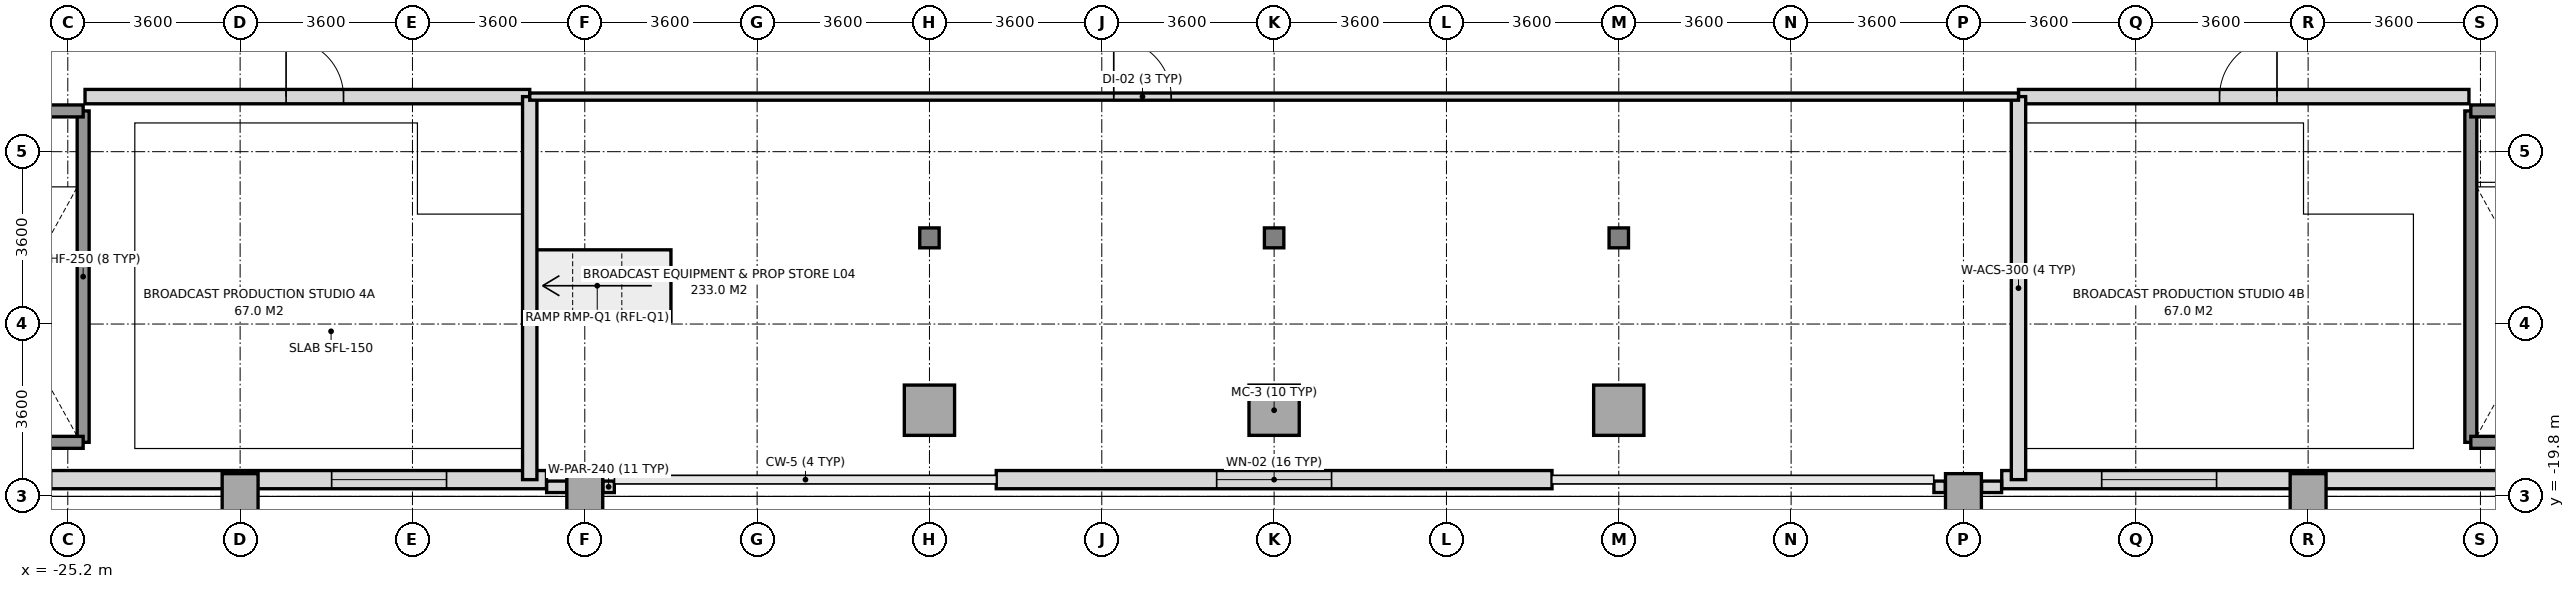
"""IFC4 building model, lengths in metres.
Left out: names, types, materials, properties, quantities, classifications, styles, units other than length and angle.
Written with IfcOpenShell. Run it as: python <this file> out.ifc"""

import sys

from ifc_helpers import new_model, si_unit, direction, frame, frame_2d, origin, origin_2d, place, context, subcontext, project, spatial, rectangle, i_section, extrude, source, transform, mapped, element, fill, save


model = new_model("IFC4")
c1 = context("Model", 3, precision=1e-05, world=origin(), true_north=direction((0.0, 1.0)))
c2 = subcontext(c1, "Body", "Model", "MODEL_VIEW")
j1 = project(units=[si_unit("LENGTHUNIT", "METRE"), si_unit("PLANEANGLEUNIT", "RADIAN")], contexts=[c1])
p1 = place(None, origin())
s1 = spatial("IfcSite", under=j1, at=p1, CompositionType="ELEMENT")
p2 = place(p1, origin())
s2 = spatial("IfcBuilding", under=s1, at=p2, CompositionType="ELEMENT")
p3 = place(p2, frame((0.0, 0.0, 20.4)))
s3 = spatial("IfcBuildingStorey", under=s2, at=p3, CompositionType="ELEMENT", Elevation=20.4)
m1 = source(origin(), c2, "Body", "SweptSolid", [
    extrude(rectangle(XDim=0.75, YDim=0.95, at=origin_2d()), origin(), (0.0, 0.0, 1.0), 4.48),
])
for number, where, z_axis, x_axis in (
    (1, (-21.6, -19.8, 0.0), (0.0, 0.0, 1.0), (1.0, 0.0, 0.0)),
    (2, (-14.4, -19.8, 0.0), (0.0, 0.0, 1.0), (1.0, 0.0, 0.0)),
):
    element("IfcColumn", number, at=place(p3, frame(where, z_axis=z_axis, x_axis=x_axis)), inside=s3, PredefinedType="COLUMN", context=c2, shape_type="MappedRepresentation", body=[
        mapped(m1, transform((0.0, 0.0, 0.0), x_axis=(1.0, 0.0, 0.0), y_axis=(0.0, 1.0, 0.0), z_axis=(0.0, 0.0, 1.0), scale=1.0)),
    ])
m2 = source(origin(), c2, "Body", "SweptSolid", [
    extrude(rectangle(XDim=1.05, YDim=1.05, at=origin_2d()), origin(), (0.0, 0.0, 1.0), 4.48),
])
p4 = place(p3, frame((-7.2, -18.0, 0.0), z_axis=(0.0, 0.0, 1.0), x_axis=(1.0, 0.0, 0.0)))
e3 = element("IfcColumn", 3, at=p4, inside=s3, PredefinedType="COLUMN", context=c2, shape_type="MappedRepresentation", body=[
    mapped(m2, transform((0.0, 0.0, 0.0), x_axis=(1.0, 0.0, 0.0), y_axis=(0.0, 1.0, 0.0), z_axis=(0.0, 0.0, 1.0), scale=1.0)),
])
m3 = source(origin(), c2, "Body", "SweptSolid", [
    extrude(i_section(OverallWidth=0.406, OverallDepth=0.416, WebThickness=0.024, FlangeThickness=0.039, at=origin_2d()), origin(), (0.0, 0.0, 1.0), 4.48),
])
p5 = place(p3, frame((-7.2, -14.4, 0.0), z_axis=(0.0, 0.0, 1.0), x_axis=(1.0, 0.0, 0.0)))
e4 = element("IfcColumn", 4, at=p5, inside=s3, PredefinedType="COLUMN", context=c2, shape_type="MappedRepresentation", body=[
    mapped(m3, transform((0.0, 0.0, 0.0), x_axis=(1.0, 0.0, 0.0), y_axis=(0.0, 1.0, 0.0), z_axis=(0.0, 0.0, 1.0), scale=1.0)),
])
p6 = place(p3, frame((0.0, -18.0, 0.0), z_axis=(0.0, 0.0, 1.0), x_axis=(1.0, 0.0, 0.0)))
e5 = element("IfcColumn", 5, at=p6, inside=s3, PredefinedType="COLUMN", context=c2, shape_type="MappedRepresentation", body=[
    mapped(m2, transform((0.0, 0.0, 0.0), x_axis=(1.0, 0.0, 0.0), y_axis=(0.0, 1.0, 0.0), z_axis=(0.0, 0.0, 1.0), scale=1.0)),
])
p7 = place(p3, frame((0.0, -14.4, 0.0), z_axis=(0.0, 0.0, 1.0), x_axis=(1.0, 0.0, 0.0)))
e6 = element("IfcColumn", 6, at=p7, inside=s3, PredefinedType="COLUMN", context=c2, shape_type="MappedRepresentation", body=[
    mapped(m3, transform((0.0, 0.0, 0.0), x_axis=(1.0, 0.0, 0.0), y_axis=(0.0, 1.0, 0.0), z_axis=(0.0, 0.0, 1.0), scale=1.0)),
])
p8 = place(p3, frame((7.2, -18.0, 0.0), z_axis=(0.0, 0.0, 1.0), x_axis=(1.0, 0.0, 0.0)))
e7 = element("IfcColumn", 7, at=p8, inside=s3, PredefinedType="COLUMN", context=c2, shape_type="MappedRepresentation", body=[
    mapped(m2, transform((0.0, 0.0, 0.0), x_axis=(1.0, 0.0, 0.0), y_axis=(0.0, 1.0, 0.0), z_axis=(0.0, 0.0, 1.0), scale=1.0)),
])
p9 = place(p3, frame((7.2, -14.4, 0.0), z_axis=(0.0, 0.0, 1.0), x_axis=(1.0, 0.0, 0.0)))
e8 = element("IfcColumn", 8, at=p9, inside=s3, PredefinedType="COLUMN", context=c2, shape_type="MappedRepresentation", body=[
    mapped(m3, transform((0.0, 0.0, 0.0), x_axis=(1.0, 0.0, 0.0), y_axis=(0.0, 1.0, 0.0), z_axis=(0.0, 0.0, 1.0), scale=1.0)),
])
for number, where, z_axis, x_axis in (
    (9, (14.4, -19.8, 0.0), (0.0, 0.0, 1.0), (1.0, 0.0, 0.0)),
    (10, (21.6, -19.8, 0.0), (0.0, 0.0, 1.0), (1.0, 0.0, 0.0)),
):
    element("IfcColumn", number, at=place(p3, frame(where, z_axis=z_axis, x_axis=x_axis)), inside=s3, PredefinedType="COLUMN", context=c2, shape_type="MappedRepresentation", body=[
        mapped(m1, transform((0.0, 0.0, 0.0), x_axis=(1.0, 0.0, 0.0), y_axis=(0.0, 1.0, 0.0), z_axis=(0.0, 0.0, 1.0), scale=1.0)),
    ])
p10 = place(p3, frame((-32.05, -19.45, 0.0), z_axis=(0.0, 0.0, 1.0), x_axis=(1.0, 0.0, 0.0)))
e11 = element("IfcWall", 11, at=p10, inside=s3, PredefinedType="SOLIDWALL", context=c2, shape_type="SweptSolid", body=[
    extrude(rectangle(XDim=16.85, YDim=0.38, at=frame_2d((8.425, 0.0))), origin(), (0.0, 0.0, 1.0), 4.48),
])
p11 = place(p10, frame((4.112, 0.0, 0.95)))
e12 = element("IfcOpeningElement", 12, at=p11, cuts=e11, PredefinedType="OPENING", context=c2, shape_type="SweptSolid", body=[
    extrude(rectangle(XDim=2.4, YDim=2.2, at=frame_2d((1.2, 1.1))), frame((0.0, 0.2, 0.0), z_axis=(0.0, -1.0, 0.0), x_axis=(1.0, 0.0, 0.0)), (0.0, 0.0, 1.0), 0.4),
])
p12 = place(p10, frame((12.362, 0.0, 0.95)))
e13 = element("IfcOpeningElement", 13, at=p12, cuts=e11, PredefinedType="OPENING", context=c2, shape_type="SweptSolid", body=[
    extrude(rectangle(XDim=2.4, YDim=2.2, at=frame_2d((1.2, 1.1))), frame((0.0, 0.2, 0.0), z_axis=(0.0, -1.0, 0.0), x_axis=(1.0, 0.0, 0.0)), (0.0, 0.0, 1.0), 0.4),
])
p13 = place(p3, frame((15.2, -19.45, 0.0), z_axis=(0.0, 0.0, 1.0), x_axis=(1.0, 0.0, 0.0)))
e14 = element("IfcWall", 14, at=p13, inside=s3, PredefinedType="SOLIDWALL", context=c2, shape_type="SweptSolid", body=[
    extrude(rectangle(XDim=16.85, YDim=0.38, at=frame_2d((8.425, 0.0))), origin(), (0.0, 0.0, 1.0), 4.48),
])
p14 = place(p13, frame((2.088, 0.0, 0.95)))
e15 = element("IfcOpeningElement", 15, at=p14, cuts=e14, PredefinedType="OPENING", context=c2, shape_type="SweptSolid", body=[
    extrude(rectangle(XDim=2.4, YDim=2.2, at=frame_2d((1.2, 1.1))), frame((0.0, 0.2, 0.0), z_axis=(0.0, -1.0, 0.0), x_axis=(1.0, 0.0, 0.0)), (0.0, 0.0, 1.0), 0.4),
])
p15 = place(p13, frame((10.338, 0.0, 0.95)))
e16 = element("IfcOpeningElement", 16, at=p15, cuts=e14, PredefinedType="OPENING", context=c2, shape_type="SweptSolid", body=[
    extrude(rectangle(XDim=2.4, YDim=2.2, at=frame_2d((1.2, 1.1))), frame((0.0, 0.2, 0.0), z_axis=(0.0, -1.0, 0.0), x_axis=(1.0, 0.0, 0.0)), (0.0, 0.0, 1.0), 0.4),
])
p16 = place(p3, frame((-5.805, -19.45, 0.0), z_axis=(0.0, 0.0, 1.0), x_axis=(1.0, 0.0, 0.0)))
e17 = element("IfcWall", 17, at=p16, inside=s3, PredefinedType="SOLIDWALL", context=c2, shape_type="SweptSolid", body=[
    extrude(rectangle(XDim=11.61, YDim=0.38, at=frame_2d((5.805, 0.0))), origin(), (0.0, 0.0, 1.0), 4.48),
])
p17 = place(p16, frame((4.605, 0.0, 0.95)))
e18 = element("IfcOpeningElement", 18, at=p17, cuts=e17, PredefinedType="OPENING", context=c2, shape_type="SweptSolid", body=[
    extrude(rectangle(XDim=2.4, YDim=2.2, at=frame_2d((1.2, 1.1))), frame((0.0, 0.2, 0.0), z_axis=(0.0, -1.0, 0.0), x_axis=(1.0, 0.0, 0.0)), (0.0, 0.0, 1.0), 0.4),
])
p18 = place(p3, frame((15.197, -19.6, 0.0), z_axis=(0.0, 0.0, 1.0), x_axis=(-1.0, 0.0, 0.0)))
e19 = element("IfcWall", 19, at=p18, inside=s3, PredefinedType="PARAPET", context=c2, shape_type="SweptSolid", body=[
    extrude(rectangle(XDim=0.419, YDim=0.24, at=frame_2d((0.209, 0.0))), origin(), (0.0, 0.0, 1.0), 1.15),
])
for number, where, z_axis, x_axis in (
    (20, (14.022, -19.6, 0.0), (0.0, 0.0, 1.0), (-1.0, 0.0, 0.0)),
    (21, (-13.783, -19.6, 0.0), (0.0, 0.0, 1.0), (-1.0, 0.0, 0.0)),
):
    element("IfcWall", number, at=place(p3, frame(where, z_axis=z_axis, x_axis=x_axis)), inside=s3, PredefinedType="PARAPET", context=c2, shape_type="SweptSolid", body=[
        extrude(rectangle(XDim=0.239, YDim=0.24, at=frame_2d((0.12, 0.0))), origin(), (0.0, 0.0, 1.0), 1.15),
    ])
p19 = place(p3, frame((-14.778, -19.6, 0.0), z_axis=(0.0, 0.0, 1.0), x_axis=(-1.0, 0.0, 0.0)))
e22 = element("IfcWall", 22, at=p19, inside=s3, PredefinedType="PARAPET", context=c2, shape_type="SweptSolid", body=[
    extrude(rectangle(XDim=0.419, YDim=0.24, at=frame_2d((0.209, 0.0))), origin(), (0.0, 0.0, 1.0), 1.15),
])
p20 = place(p3, frame((-24.879, -18.671, 0.0), z_axis=(0.0, 0.0, 1.0), x_axis=(0.0, 1.0, 0.0)))
e23 = element("IfcWall", 23, at=p20, inside=s3, PredefinedType="SOLIDWALL", context=c2, shape_type="SweptSolid", body=[
    extrude(rectangle(XDim=6.922, YDim=0.25, at=frame_2d((3.461, 0.0))), origin(), (0.0, 0.0, 1.0), 4.48),
])
p21 = place(p3, frame((-28.001, -18.671, 0.0), z_axis=(0.0, 0.0, 1.0), x_axis=(1.0, 0.0, 0.0)))
e24 = element("IfcWall", 24, at=p21, inside=s3, PredefinedType="SOLIDWALL", context=c2, shape_type="SweptSolid", body=[
    extrude(rectangle(XDim=3.122, YDim=0.25, at=frame_2d((1.561, 0.0))), origin(), (0.0, 0.0, 1.0), 4.48),
])
p22 = place(p3, frame((-28.001, -11.749, 0.0), z_axis=(0.0, 0.0, 1.0), x_axis=(1.0, 0.0, 0.0)))
e25 = element("IfcWall", 25, at=p22, inside=s3, PredefinedType="SOLIDWALL", context=c2, shape_type="SweptSolid", body=[
    extrude(rectangle(XDim=3.122, YDim=0.25, at=frame_2d((1.561, 0.0))), origin(), (0.0, 0.0, 1.0), 4.48),
])
p23 = place(p22, frame((0.8, 0.0, 0.0)))
e26 = element("IfcOpeningElement", 26, at=p23, cuts=e25, PredefinedType="OPENING", context=c2, shape_type="SweptSolid", body=[
    extrude(rectangle(XDim=1.2, YDim=2.2, at=frame_2d((0.6, 1.1))), frame((0.0, 0.135, 0.0), z_axis=(0.0, -1.0, 0.0), x_axis=(1.0, 0.0, 0.0)), (0.0, 0.0, 1.0), 0.27),
])
p24 = place(p3, frame((24.999, -18.671, 0.0), z_axis=(0.0, 0.0, 1.0), x_axis=(0.0, 1.0, 0.0)))
e27 = element("IfcWall", 27, at=p24, inside=s3, PredefinedType="SOLIDWALL", context=c2, shape_type="SweptSolid", body=[
    extrude(rectangle(XDim=6.922, YDim=0.25, at=frame_2d((3.461, 0.0))), origin(), (0.0, 0.0, 1.0), 4.48),
])
p25 = place(p3, frame((24.999, -18.671, 0.0), z_axis=(0.0, 0.0, 1.0), x_axis=(1.0, 0.0, 0.0)))
e28 = element("IfcWall", 28, at=p25, inside=s3, PredefinedType="SOLIDWALL", context=c2, shape_type="SweptSolid", body=[
    extrude(rectangle(XDim=3.122, YDim=0.25, at=frame_2d((1.561, 0.0))), origin(), (0.0, 0.0, 1.0), 4.48),
])
p26 = place(p3, frame((24.999, -11.749, 0.0), z_axis=(0.0, 0.0, 1.0), x_axis=(1.0, 0.0, 0.0)))
e29 = element("IfcWall", 29, at=p26, inside=s3, PredefinedType="SOLIDWALL", context=c2, shape_type="SweptSolid", body=[
    extrude(rectangle(XDim=3.122, YDim=0.25, at=frame_2d((1.561, 0.0))), origin(), (0.0, 0.0, 1.0), 4.48),
])
p27 = place(p26, frame((0.8, 0.0, 0.0)))
e30 = element("IfcOpeningElement", 30, at=p27, cuts=e29, PredefinedType="OPENING", context=c2, shape_type="SweptSolid", body=[
    extrude(rectangle(XDim=1.2, YDim=2.2, at=frame_2d((0.6, 1.1))), frame((0.0, 0.135, 0.0), z_axis=(0.0, -1.0, 0.0), x_axis=(1.0, 0.0, 0.0)), (0.0, 0.0, 1.0), 0.27),
])
p28 = place(p3, frame((-24.84, -11.45, 0.0), z_axis=(0.0, 0.0, 1.0), x_axis=(1.0, 0.0, 0.0)))
e31 = element("IfcWall", 31, at=p28, inside=s3, PredefinedType="SOLIDWALL", context=c2, shape_type="SweptSolid", body=[
    extrude(rectangle(XDim=9.29, YDim=0.3, at=frame_2d((4.645, 0.0))), origin(), (0.0, 0.0, 1.0), 4.48),
])
p29 = place(p28, frame((4.2, 0.0, 0.0)))
e32 = element("IfcOpeningElement", 32, at=p29, cuts=e31, PredefinedType="OPENING", context=c2, shape_type="SweptSolid", body=[
    extrude(rectangle(XDim=1.2, YDim=2.2, at=frame_2d((0.6, 1.1))), frame((0.0, 0.16, 0.0), z_axis=(0.0, -1.0, 0.0), x_axis=(1.0, 0.0, 0.0)), (0.0, 0.0, 1.0), 0.32),
])
p30 = place(p3, frame((-15.55, -19.45, 0.0), z_axis=(0.0, 0.0, 1.0), x_axis=(0.0, 1.0, 0.0)))
e33 = element("IfcWall", 33, at=p30, inside=s3, PredefinedType="SOLIDWALL", context=c2, shape_type="SweptSolid", body=[
    extrude(rectangle(XDim=8.0, YDim=0.3, at=frame_2d((4.0, 0.0))), origin(), (0.0, 0.0, 1.0), 4.48),
])
p31 = place(p3, frame((15.55, -11.45, 0.0), z_axis=(0.0, 0.0, 1.0), x_axis=(1.0, 0.0, 0.0)))
e34 = element("IfcWall", 34, at=p31, inside=s3, PredefinedType="SOLIDWALL", context=c2, shape_type="SweptSolid", body=[
    extrude(rectangle(XDim=9.41, YDim=0.3, at=frame_2d((4.705, 0.0))), origin(), (0.0, 0.0, 1.0), 4.48),
])
p32 = place(p31, frame((4.2, 0.0, 0.0)))
e35 = element("IfcOpeningElement", 35, at=p32, cuts=e34, PredefinedType="OPENING", context=c2, shape_type="SweptSolid", body=[
    extrude(rectangle(XDim=1.2, YDim=2.2, at=frame_2d((0.6, 1.1))), frame((0.0, 0.16, 0.0), z_axis=(0.0, -1.0, 0.0), x_axis=(1.0, 0.0, 0.0)), (0.0, 0.0, 1.0), 0.32),
])
p33 = place(p3, frame((15.55, -19.45, 0.0), z_axis=(0.0, 0.0, 1.0), x_axis=(0.0, 1.0, 0.0)))
e36 = element("IfcWall", 36, at=p33, inside=s3, PredefinedType="SOLIDWALL", context=c2, shape_type="SweptSolid", body=[
    extrude(rectangle(XDim=8.0, YDim=0.3, at=frame_2d((4.0, 0.0))), origin(), (0.0, 0.0, 1.0), 4.48),
])
p34 = place(p3, frame((-15.55, -11.45, 0.0), z_axis=(0.0, 0.0, 1.0), x_axis=(1.0, 0.0, 0.0)))
e37 = element("IfcWall", 37, at=p34, inside=s3, PredefinedType="PARTITIONING", context=c2, shape_type="SweptSolid", body=[
    extrude(rectangle(XDim=31.1, YDim=0.15, at=frame_2d((15.55, 0.0))), origin(), (0.0, 0.0, 1.0), 4.48),
])
p35 = place(p34, frame((12.2, 0.0, 0.0)))
e38 = element("IfcOpeningElement", 38, at=p35, cuts=e37, PredefinedType="OPENING", context=c2, shape_type="SweptSolid", body=[
    extrude(rectangle(XDim=1.2, YDim=2.2, at=frame_2d((0.6, 1.1))), frame((0.0, 0.085, 0.0), z_axis=(0.0, -1.0, 0.0), x_axis=(1.0, 0.0, 0.0)), (0.0, 0.0, 1.0), 0.17),
])
m4 = source(origin(), c2, "Body", "SweptSolid", [
    extrude(rectangle(XDim=2.4, YDim=2.2, at=frame_2d((1.2, 1.1))), frame((0.0, 0.03, 0.0), z_axis=(0.0, -1.0, 0.0), x_axis=(1.0, 0.0, 0.0)), (0.0, 0.0, 1.0), 0.06),
])
p36 = place(p12, origin())
e39 = element("IfcWindow", 39, at=p36, inside=s3, PartitioningType="SINGLE_PANEL", PredefinedType="WINDOW", context=c2, shape_type="MappedRepresentation", body=[
    mapped(m4, transform((0.0, 0.0, 0.0), x_axis=(1.0, 0.0, 0.0), y_axis=(0.0, 1.0, 0.0), z_axis=(0.0, 0.0, 1.0), scale=1.0)),
])
fill(e13, e39)
p37 = place(p14, origin())
e40 = element("IfcWindow", 40, at=p37, inside=s3, PartitioningType="SINGLE_PANEL", PredefinedType="WINDOW", context=c2, shape_type="MappedRepresentation", body=[
    mapped(m4, transform((0.0, 0.0, 0.0), x_axis=(1.0, 0.0, 0.0), y_axis=(0.0, 1.0, 0.0), z_axis=(0.0, 0.0, 1.0), scale=1.0)),
])
fill(e15, e40)
p38 = place(p17, origin())
e41 = element("IfcWindow", 41, at=p38, inside=s3, PartitioningType="SINGLE_PANEL", PredefinedType="WINDOW", context=c2, shape_type="MappedRepresentation", body=[
    mapped(m4, transform((0.0, 0.0, 0.0), x_axis=(1.0, 0.0, 0.0), y_axis=(0.0, 1.0, 0.0), z_axis=(0.0, 0.0, 1.0), scale=1.0)),
])
fill(e18, e41)
m5 = source(origin(), c2, "Body", "SweptSolid", [
    extrude(rectangle(XDim=1.2, YDim=2.2, at=frame_2d((0.6, 1.1))), frame((0.0, 0.025, 0.0), z_axis=(0.0, -1.0, 0.0), x_axis=(1.0, 0.0, 0.0)), (0.0, 0.0, 1.0), 0.05),
])
p39 = place(p29, origin())
e42 = element("IfcDoor", 42, at=p39, inside=s3, OperationType="SINGLE_SWING_LEFT", PredefinedType="DOOR", context=c2, shape_type="MappedRepresentation", body=[
    mapped(m5, transform((0.0, 0.0, 0.0), x_axis=(1.0, 0.0, 0.0), y_axis=(0.0, 1.0, 0.0), z_axis=(0.0, 0.0, 1.0), scale=1.0)),
])
fill(e32, e42)
p40 = place(p32, origin())
e43 = element("IfcDoor", 43, at=p40, inside=s3, OperationType="SINGLE_SWING_RIGHT", PredefinedType="DOOR", context=c2, shape_type="MappedRepresentation", body=[
    mapped(m5, transform((0.0, 0.0, 0.0), x_axis=(1.0, 0.0, 0.0), y_axis=(0.0, 1.0, 0.0), z_axis=(0.0, 0.0, 1.0), scale=1.0)),
])
fill(e35, e43)
p41 = place(p35, origin())
e44 = element("IfcDoor", 44, at=p41, inside=s3, OperationType="SINGLE_SWING_LEFT", PredefinedType="DOOR", context=c2, shape_type="MappedRepresentation", body=[
    mapped(m5, transform((0.0, 0.0, 0.0), x_axis=(1.0, 0.0, 0.0), y_axis=(0.0, 1.0, 0.0), z_axis=(0.0, 0.0, 1.0), scale=1.0)),
])
fill(e38, e44)
save(model, sys.argv[1])
